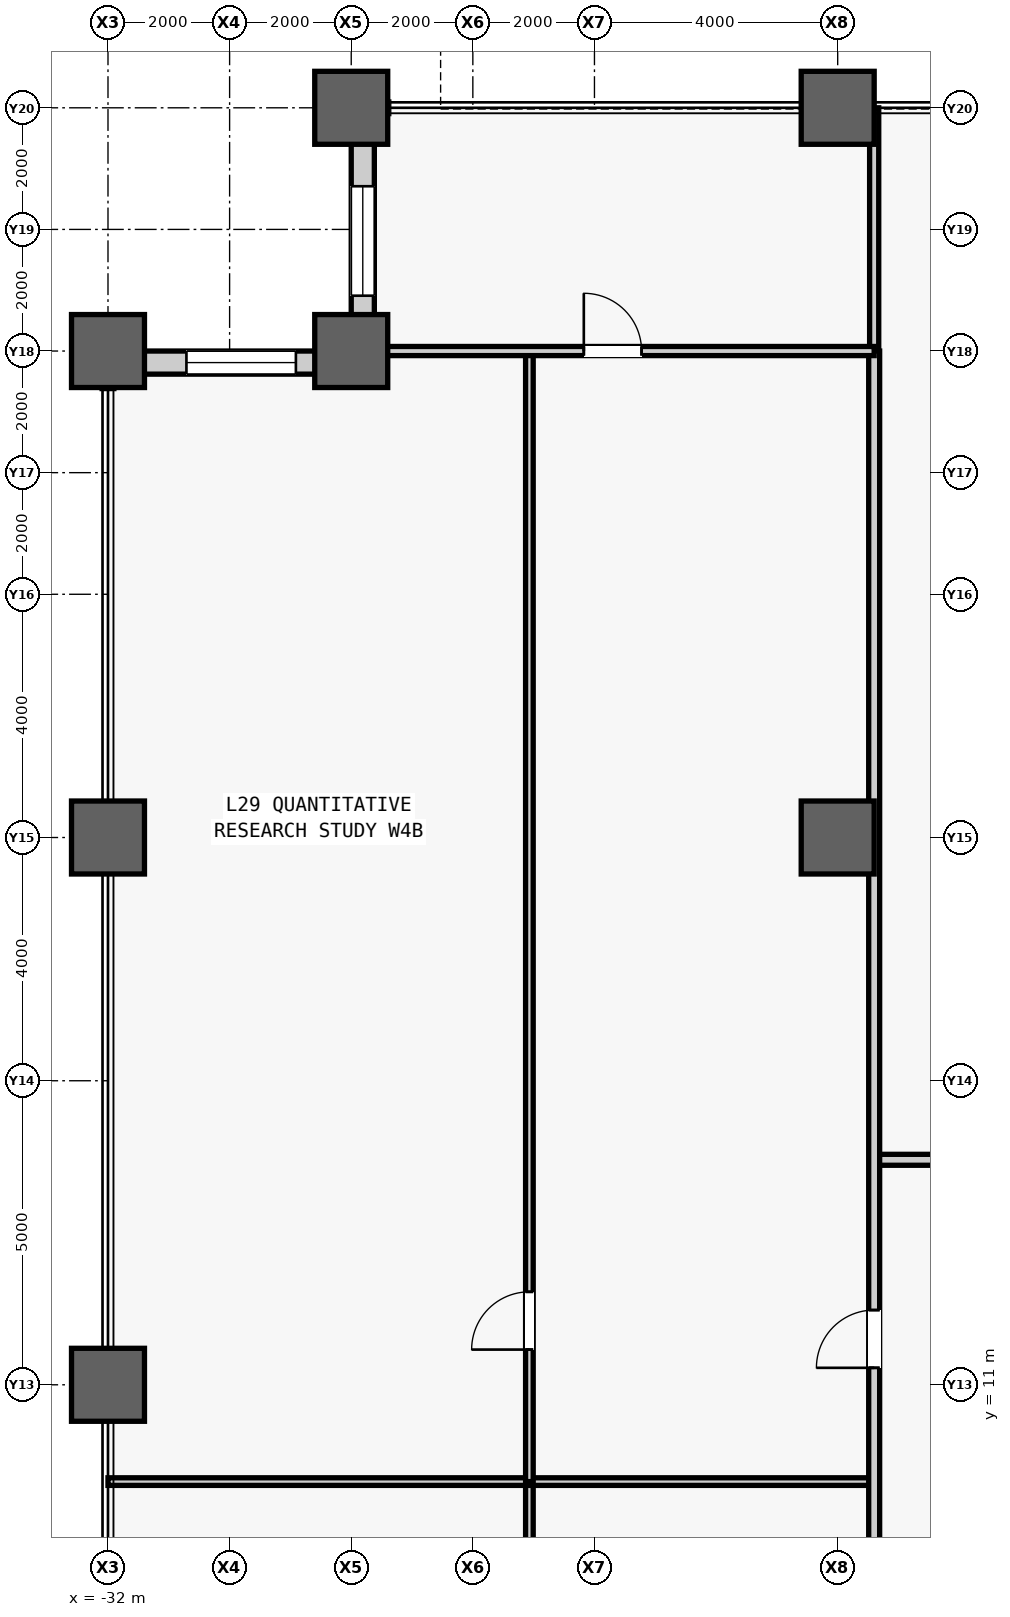
"""IFC4 building model, lengths in metres.
Left out: names, types, materials, properties, quantities, classifications, styles, units other than length and angle.
Written with IfcOpenShell. Run it as: python <this file> out.ifc"""

import sys

from ifc_helpers import new_model, si_unit, direction, frame, frame_2d, origin, origin_2d, place, context, subcontext, project, spatial, rectangle, hollow_rectangle, extrude, source, transform, mapped, element, fill, save


model = new_model("IFC4")
c1 = context("Model", 3, precision=1e-05, world=origin(), true_north=direction((0.0, 1.0)))
c2 = subcontext(c1, "Body", "Model", "MODEL_VIEW")
j1 = project(units=[si_unit("LENGTHUNIT", "METRE"), si_unit("PLANEANGLEUNIT", "RADIAN")], contexts=[c1])
p1 = place(None, origin())
s1 = spatial("IfcSite", under=j1, at=p1, CompositionType="ELEMENT")
p2 = place(p1, origin())
s2 = spatial("IfcBuilding", under=s1, at=p2, CompositionType="ELEMENT")
p3 = place(p2, frame((0.0, 0.0, 128.3)))
s3 = spatial("IfcBuildingStorey", under=s2, at=p3, CompositionType="ELEMENT", Elevation=128.3)
m1 = source(origin(), c2, "Body", "SweptSolid", [
    extrude(hollow_rectangle(XDim=1.2, YDim=1.2, WallThickness=0.07, at=origin_2d()), origin(), (0.0, 0.0, 1.0), 4.1),
])
for number, where, z_axis, x_axis in (
    (1, (-32.0, 11.0, 0.0), (0.0, 0.0, 1.0), (1.0, 0.0, 0.0)),
    (2, (-32.0, 20.0, 0.0), (0.0, 0.0, 1.0), (1.0, 0.0, 0.0)),
    (3, (-32.0, 28.0, 0.0), (0.0, 0.0, 1.0), (1.0, 0.0, 0.0)),
    (4, (-28.0, 28.0, 0.0), (0.0, 0.0, 1.0), (1.0, 0.0, 0.0)),
    (5, (-28.0, 32.0, 0.0), (0.0, 0.0, 1.0), (1.0, 0.0, 0.0)),
    (6, (-20.0, 20.0, 0.0), (0.0, 0.0, 1.0), (1.0, 0.0, 0.0)),
    (7, (-20.0, 32.0, 0.0), (0.0, 0.0, 1.0), (1.0, 0.0, 0.0)),
):
    element("IfcColumn", number, at=place(p3, frame(where, z_axis=z_axis, x_axis=x_axis)), inside=s3, PredefinedType="COLUMN", context=c2, shape_type="MappedRepresentation", body=[
        mapped(m1, transform((0.0, 0.0, 0.0), scale=1.0)),
    ])
m2 = source(origin(), c2, "Body", "SweptSolid", [
    extrude(rectangle(XDim=3.62, YDim=0.38, at=frame_2d((1.81, 0.0))), origin(), (0.0, 0.0, 1.0), 3.145),
])
p4 = place(p3, frame((-27.81, 28.0, 0.0), z_axis=(0.0, 0.0, 1.0), x_axis=(0.0, 1.0, 0.0)))
e8 = element("IfcWall", 8, at=p4, inside=s3, PredefinedType="STANDARD", context=c2, shape_type="MappedRepresentation", body=[
    mapped(m2, transform((0.0, 0.0, 0.0), scale=1.0)),
])
m3 = source(origin(), c2, "Body", "SweptSolid", [
    extrude(rectangle(XDim=1.8, YDim=2.4, at=frame_2d((0.9, 1.2))), frame((0.0, 0.2, 0.0), z_axis=(0.0, -1.0, 0.0), x_axis=(1.0, 0.0, 0.0)), (0.0, 0.0, 1.0), 0.4),
])
p5 = place(p4, frame((0.91, 0.0, 0.5)))
e9 = element("IfcOpeningElement", 9, at=p5, cuts=e8, PredefinedType="OPENING", context=c2, shape_type="MappedRepresentation", body=[
    mapped(m3, transform((0.0, 0.0, 0.0), scale=1.0)),
])
p6 = place(p3, frame((-28.0, 27.81, 0.0), z_axis=(0.0, 0.0, 1.0), x_axis=(-1.0, 0.0, 0.0)))
e10 = element("IfcWall", 10, at=p6, inside=s3, PredefinedType="STANDARD", context=c2, shape_type="MappedRepresentation", body=[
    mapped(m2, transform((0.0, 0.0, 0.0), scale=1.0)),
])
p7 = place(p6, frame((0.91, 0.0, 0.5)))
e11 = element("IfcOpeningElement", 11, at=p7, cuts=e10, PredefinedType="OPENING", context=c2, shape_type="MappedRepresentation", body=[
    mapped(m3, transform((0.0, 0.0, 0.0), scale=1.0)),
])
m4 = source(origin(), c2, "Body", "SweptSolid", [
    extrude(rectangle(XDim=37.1, YDim=0.18, at=frame_2d((18.55, 0.0))), origin(), (0.0, 0.0, 1.0), 3.84),
])
p8 = place(p3, frame((-19.4, 14.7, 0.0), z_axis=(0.0, 0.0, 1.0), x_axis=(1.0, 0.0, 0.0)))
e12 = element("IfcWall", 12, at=p8, inside=s3, PredefinedType="PARTITIONING", context=c2, shape_type="MappedRepresentation", body=[
    mapped(m4, transform((0.0, 0.0, 0.0), scale=1.0)),
])
m5 = source(origin(), c2, "Body", "SweptSolid", [
    extrude(rectangle(XDim=1.05, YDim=2.2, at=frame_2d((0.525, 1.1))), frame((0.0, 0.1, 0.0), z_axis=(0.0, -1.0, 0.0), x_axis=(1.0, 0.0, 0.0)), (0.0, 0.0, 1.0), 0.2),
])
p9 = place(p8, frame((10.323, 0.0, 0.0)))
e13 = element("IfcOpeningElement", 13, at=p9, cuts=e12, PredefinedType="OPENING", context=c2, shape_type="MappedRepresentation", body=[
    mapped(m5, transform((0.0, 0.0, 0.0), scale=1.0)),
])
p10 = place(p8, frame((24.722, 0.0, 0.0)))
e14 = element("IfcOpeningElement", 14, at=p10, cuts=e12, PredefinedType="OPENING", context=c2, shape_type="MappedRepresentation", body=[
    mapped(m5, transform((0.0, 0.0, 0.0), scale=1.0)),
])
m6 = source(origin(), c2, "Body", "SweptSolid", [
    extrude(rectangle(XDim=4.0, YDim=0.15, at=frame_2d((2.0, 0.0))), origin(), (0.0, 0.0, 1.0), 3.84),
])
p11 = place(p3, frame((-19.4, 28.0, 0.0), z_axis=(0.0, 0.0, 1.0), x_axis=(0.0, 1.0, 0.0)))
e15 = element("IfcWall", 15, at=p11, inside=s3, PredefinedType="PARTITIONING", context=c2, shape_type="MappedRepresentation", body=[
    mapped(m6, transform((0.0, 0.0, 0.0), scale=1.0)),
])
m7 = source(origin(), c2, "Body", "SweptSolid", [
    extrude(rectangle(XDim=7.644, YDim=0.125, at=frame_2d((3.822, 0.0))), origin(), (0.0, 0.0, 1.0), 3.84),
])
p12 = place(p3, frame((-25.07, 1.764, 0.0), z_axis=(0.0, 0.0, 1.0), x_axis=(0.0, 1.0, 0.0)))
e16 = element("IfcWall", 16, at=p12, inside=s3, PredefinedType="PARTITIONING", context=c2, shape_type="MappedRepresentation", body=[
    mapped(m7, transform((0.0, 0.0, 0.0), scale=1.0)),
])
m8 = source(origin(), c2, "Body", "SweptSolid", [
    extrude(rectangle(XDim=0.95, YDim=2.15, at=frame_2d((0.475, 1.075))), frame((0.0, 0.073, 0.0), z_axis=(0.0, -1.0, 0.0), x_axis=(1.0, 0.0, 0.0)), (0.0, 0.0, 1.0), 0.145),
])
p13 = place(p12, frame((3.347, 0.0, 0.0)))
e17 = element("IfcOpeningElement", 17, at=p13, cuts=e16, PredefinedType="OPENING", context=c2, shape_type="MappedRepresentation", body=[
    mapped(m8, transform((0.0, 0.0, 0.0), scale=1.0)),
])
m9 = source(origin(), c2, "Body", "SweptSolid", [
    extrude(rectangle(XDim=12.6, YDim=0.125, at=frame_2d((6.3, 0.0))), origin(), (0.0, 0.0, 1.0), 3.84),
])
p14 = place(p3, frame((-32.0, 9.408, 0.0), z_axis=(0.0, 0.0, 1.0), x_axis=(1.0, 0.0, 0.0)))
e18 = element("IfcWall", 18, at=p14, inside=s3, PredefinedType="PARTITIONING", context=c2, shape_type="MappedRepresentation", body=[
    mapped(m9, transform((0.0, 0.0, 0.0), scale=1.0)),
])
m10 = source(origin(), c2, "Body", "SweptSolid", [
    extrude(rectangle(XDim=18.592, YDim=0.125, at=frame_2d((9.296, 0.0))), origin(), (0.0, 0.0, 1.0), 3.84),
])
p15 = place(p3, frame((-25.07, 9.408, 0.0), z_axis=(0.0, 0.0, 1.0), x_axis=(0.0, 1.0, 0.0)))
e19 = element("IfcWall", 19, at=p15, inside=s3, PredefinedType="PARTITIONING", context=c2, shape_type="MappedRepresentation", body=[
    mapped(m10, transform((0.0, 0.0, 0.0), scale=1.0)),
])
p16 = place(p15, frame((2.171, 0.0, 0.0)))
e20 = element("IfcOpeningElement", 20, at=p16, cuts=e19, PredefinedType="OPENING", context=c2, shape_type="MappedRepresentation", body=[
    mapped(m8, transform((0.0, 0.0, 0.0), scale=1.0)),
])
m11 = source(origin(), c2, "Body", "SweptSolid", [
    extrude(rectangle(XDim=56.0, YDim=0.18, at=frame_2d((28.0, 0.0))), origin(), (0.0, 0.0, 1.0), 3.371),
])
p17 = place(p3, frame((-19.4, -28.0, 0.0), z_axis=(0.0, 0.0, 1.0), x_axis=(0.0, 1.0, 0.0)))
e21 = element("IfcWall", 21, at=p17, inside=s3, PredefinedType="PARTITIONING", context=c2, shape_type="MappedRepresentation", body=[
    mapped(m11, transform((0.0, 0.0, 0.0), scale=1.0)),
])
m12 = source(origin(), c2, "Body", "SweptSolid", [
    extrude(rectangle(XDim=0.95, YDim=2.15, at=frame_2d((0.475, 1.075))), frame((0.0, 0.1, 0.0), z_axis=(0.0, -1.0, 0.0), x_axis=(1.0, 0.0, 0.0)), (0.0, 0.0, 1.0), 0.2),
])
p18 = place(p17, frame((16.8, 0.0, 0.0)))
e22 = element("IfcOpeningElement", 22, at=p18, cuts=e21, PredefinedType="OPENING", context=c2, shape_type="MappedRepresentation", body=[
    mapped(m12, transform((0.0, 0.0, 0.0), scale=1.0)),
])
p19 = place(p17, frame((24.732, 0.0, 0.0)))
e23 = element("IfcOpeningElement", 23, at=p19, cuts=e21, PredefinedType="OPENING", context=c2, shape_type="MappedRepresentation", body=[
    mapped(m12, transform((0.0, 0.0, 0.0), scale=1.0)),
])
p20 = place(p17, frame((33.111, 0.0, 0.0)))
e24 = element("IfcOpeningElement", 24, at=p20, cuts=e21, PredefinedType="OPENING", context=c2, shape_type="MappedRepresentation", body=[
    mapped(m12, transform((0.0, 0.0, 0.0), scale=1.0)),
])
p21 = place(p17, frame((39.279, 0.0, 0.0)))
e25 = element("IfcOpeningElement", 25, at=p21, cuts=e21, PredefinedType="OPENING", context=c2, shape_type="MappedRepresentation", body=[
    mapped(m12, transform((0.0, 0.0, 0.0), scale=1.0)),
])
m13 = source(origin(), c2, "Body", "SweptSolid", [
    extrude(rectangle(XDim=8.6, YDim=0.15, at=frame_2d((4.3, 0.0))), origin(), (0.0, 0.0, 1.0), 3.84),
])
p22 = place(p3, frame((-28.0, 28.0, 0.0), z_axis=(0.0, 0.0, 1.0), x_axis=(1.0, 0.0, 0.0)))
e26 = element("IfcWall", 26, at=p22, inside=s3, PredefinedType="PARTITIONING", context=c2, shape_type="MappedRepresentation", body=[
    mapped(m13, transform((0.0, 0.0, 0.0), scale=1.0)),
])
m14 = source(origin(), c2, "Body", "SweptSolid", [
    extrude(rectangle(XDim=0.95, YDim=2.15, at=frame_2d((0.475, 1.075))), frame((0.0, 0.085, 0.0), z_axis=(0.0, -1.0, 0.0), x_axis=(1.0, 0.0, 0.0)), (0.0, 0.0, 1.0), 0.17),
])
p23 = place(p22, frame((3.825, 0.0, 0.0)))
e27 = element("IfcOpeningElement", 27, at=p23, cuts=e26, PredefinedType="OPENING", context=c2, shape_type="MappedRepresentation", body=[
    mapped(m14, transform((0.0, 0.0, 0.0), scale=1.0)),
])
m15 = source(origin(), c2, "Body", "SweptSolid", [
    extrude(rectangle(XDim=1.8, YDim=2.4, at=frame_2d((0.9, 1.2))), frame((0.0, 0.03, 0.0), z_axis=(0.0, -1.0, 0.0), x_axis=(1.0, 0.0, 0.0)), (0.0, 0.0, 1.0), 0.06),
])
p24 = place(p5, origin())
e28 = element("IfcWindow", 28, at=p24, inside=s3, PartitioningType="SINGLE_PANEL", PredefinedType="WINDOW", context=c2, shape_type="MappedRepresentation", body=[
    mapped(m15, transform((0.0, 0.0, 0.0), scale=1.0)),
])
fill(e9, e28)
p25 = place(p7, origin())
e29 = element("IfcWindow", 29, at=p25, inside=s3, PartitioningType="SINGLE_PANEL", PredefinedType="WINDOW", context=c2, shape_type="MappedRepresentation", body=[
    mapped(m15, transform((0.0, 0.0, 0.0), scale=1.0)),
])
fill(e11, e29)
m16 = source(origin(), c2, "Body", "SweptSolid", [
    extrude(rectangle(XDim=0.95, YDim=2.15, at=frame_2d((0.475, 1.075))), frame((0.0, 0.025, 0.0), z_axis=(0.0, -1.0, 0.0), x_axis=(1.0, 0.0, 0.0)), (0.0, 0.0, 1.0), 0.05),
])
p26 = place(p16, origin())
e30 = element("IfcDoor", 30, at=p26, inside=s3, OperationType="SINGLE_SWING_LEFT", PredefinedType="DOOR", context=c2, shape_type="MappedRepresentation", body=[
    mapped(m16, transform((0.0, 0.0, 0.0), scale=1.0)),
])
fill(e20, e30)
p27 = place(p21, origin())
e31 = element("IfcDoor", 31, at=p27, inside=s3, OperationType="SINGLE_SWING_LEFT", PredefinedType="DOOR", context=c2, shape_type="MappedRepresentation", body=[
    mapped(m16, transform((0.0, 0.0, 0.0), scale=1.0)),
])
fill(e25, e31)
p28 = place(p23, origin())
e32 = element("IfcDoor", 32, at=p28, inside=s3, OperationType="SINGLE_SWING_LEFT", PredefinedType="DOOR", context=c2, shape_type="MappedRepresentation", body=[
    mapped(m16, transform((0.0, 0.0, 0.0), scale=1.0)),
])
fill(e27, e32)
save(model, sys.argv[1])
